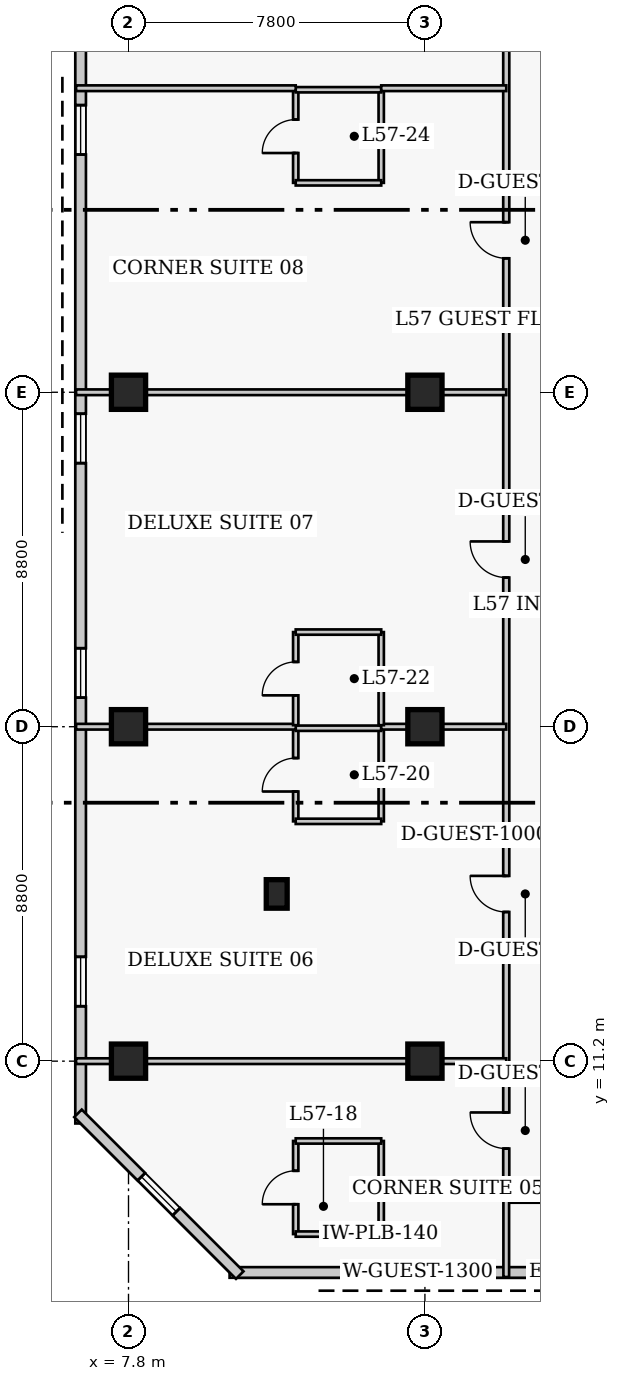
"""IFC4 building model, lengths in metres.
Left out: names, types, materials, properties, quantities, classifications, styles, units other than length and angle.
Written with IfcOpenShell. Run it as: python <this file> out.ifc"""

import sys

from ifc_helpers import new_model, si_unit, direction, frame, frame_2d, origin, origin_2d, place, context, subcontext, project, spatial, rectangle, extrude, element, fill, save


model = new_model("IFC4")
c1 = context("Model", 3, precision=1e-05, world=origin(), true_north=direction((0.0, 1.0)))
c2 = subcontext(c1, "Body", "Model", "MODEL_VIEW")
j1 = project(units=[si_unit("LENGTHUNIT", "METRE"), si_unit("PLANEANGLEUNIT", "RADIAN")], contexts=[c1])
p1 = place(None, origin())
s1 = spatial("IfcSite", under=j1, at=p1, CompositionType="ELEMENT")
p2 = place(p1, origin())
s2 = spatial("IfcBuilding", under=s1, at=p2, CompositionType="ELEMENT")
p3 = place(p2, frame((0.0, 0.0, 228.0)))
s3 = spatial("IfcBuildingStorey", under=s2, at=p3, CompositionType="ELEMENT", Elevation=228.0)
for number, where, z_axis, x_axis in (
    (1, (7.8, 11.2, 0.0), (0.0, 0.0, 1.0), (1.0, 0.0, 0.0)),
    (2, (7.8, 20.0, 0.0), (0.0, 0.0, 1.0), (1.0, 0.0, 0.0)),
    (3, (7.8, 28.8, 0.0), (0.0, 0.0, 1.0), (1.0, 0.0, 0.0)),
    (4, (15.6, 11.2, 0.0), (0.0, 0.0, 1.0), (1.0, 0.0, 0.0)),
    (5, (15.6, 20.0, 0.0), (0.0, 0.0, 1.0), (1.0, 0.0, 0.0)),
    (6, (15.6, 28.8, 0.0), (0.0, 0.0, 1.0), (1.0, 0.0, 0.0)),
):
    element("IfcColumn", number, at=place(p3, frame(where, z_axis=z_axis, x_axis=x_axis)), inside=s3, PredefinedType="COLUMN", context=c2, shape_type="SweptSolid", body=[
        extrude(rectangle(XDim=0.9, YDim=0.9, at=origin_2d()), origin(), (0.0, 0.0, 1.0), 3.9),
    ])
p4 = place(p3, frame((11.7, 15.6, 0.0), z_axis=(0.0, 0.0, 1.0), x_axis=(1.0, 0.0, 0.0)))
e7 = element("IfcColumn", 7, at=p4, inside=s3, PredefinedType="PILASTER", context=c2, shape_type="SweptSolid", body=[
    extrude(rectangle(XDim=0.55, YDim=0.75, at=origin_2d()), origin(), (0.0, 0.0, 1.0), 3.9),
])
p5 = place(p3, frame((10.46, 5.64, 0.0), z_axis=(0.0, 0.0, 1.0), x_axis=(1.0, 0.0, 0.0)))
e8 = element("IfcWall", 8, at=p5, inside=s3, PredefinedType="SOLIDWALL", context=c2, shape_type="SweptSolid", body=[
    extrude(rectangle(XDim=25.83, YDim=0.28, at=frame_2d((12.915, 0.0))), origin(), (0.0, 0.0, 1.0), 3.56),
])
p6 = place(p5, frame((4.305, 0.0, 0.85)))
e9 = element("IfcOpeningElement", 9, at=p6, cuts=e8, PredefinedType="OPENING", context=c2, shape_type="SweptSolid", body=[
    extrude(rectangle(XDim=1.3, YDim=1.7, at=frame_2d((0.65, 0.85))), frame((0.0, 0.15, 0.0), z_axis=(0.0, -1.0, 0.0), x_axis=(1.0, 0.0, 0.0)), (0.0, 0.0, 1.0), 0.3),
])
p7 = place(p5, frame((11.615, 0.0, 0.85)))
e10 = element("IfcOpeningElement", 10, at=p7, cuts=e8, PredefinedType="OPENING", context=c2, shape_type="SweptSolid", body=[
    extrude(rectangle(XDim=1.3, YDim=1.7, at=frame_2d((0.65, 0.85))), frame((0.0, 0.15, 0.0), z_axis=(0.0, -1.0, 0.0), x_axis=(1.0, 0.0, 0.0)), (0.0, 0.0, 1.0), 0.3),
])
p8 = place(p5, frame((20.875, 0.0, 0.85)))
e11 = element("IfcOpeningElement", 11, at=p8, cuts=e8, PredefinedType="OPENING", context=c2, shape_type="SweptSolid", body=[
    extrude(rectangle(XDim=1.3, YDim=1.7, at=frame_2d((0.65, 0.85))), frame((0.0, 0.15, 0.0), z_axis=(0.0, -1.0, 0.0), x_axis=(1.0, 0.0, 0.0)), (0.0, 0.0, 1.0), 0.3),
])
p9 = place(p5, frame((17.125, 0.0, 0.85)))
e12 = element("IfcOpeningElement", 12, at=p9, cuts=e8, PredefinedType="OPENING", context=c2, shape_type="SweptSolid", body=[
    extrude(rectangle(XDim=1.3, YDim=1.7, at=frame_2d((0.65, 0.85))), frame((0.0, 0.15, 0.0), z_axis=(0.0, -1.0, 0.0), x_axis=(1.0, 0.0, 0.0)), (0.0, 0.0, 1.0), 0.3),
])
p10 = place(p3, frame((6.54, 39.44, 0.0), z_axis=(0.0, 0.0, 1.0), x_axis=(0.0, -1.0, 0.0)))
e13 = element("IfcWall", 13, at=p10, inside=s3, PredefinedType="SOLIDWALL", context=c2, shape_type="SweptSolid", body=[
    extrude(rectangle(XDim=29.88, YDim=0.28, at=frame_2d((14.94, 0.0))), origin(), (0.0, 0.0, 1.0), 3.56),
])
p11 = place(p10, frame((3.085, 0.0, 0.85)))
e14 = element("IfcOpeningElement", 14, at=p11, cuts=e13, PredefinedType="OPENING", context=c2, shape_type="SweptSolid", body=[
    extrude(rectangle(XDim=1.3, YDim=1.7, at=frame_2d((0.65, 0.85))), frame((0.0, 0.15, 0.0), z_axis=(0.0, -1.0, 0.0), x_axis=(1.0, 0.0, 0.0)), (0.0, 0.0, 1.0), 0.3),
])
p12 = place(p10, frame((11.205, 0.0, 0.85)))
e15 = element("IfcOpeningElement", 15, at=p12, cuts=e13, PredefinedType="OPENING", context=c2, shape_type="SweptSolid", body=[
    extrude(rectangle(XDim=1.3, YDim=1.7, at=frame_2d((0.65, 0.85))), frame((0.0, 0.15, 0.0), z_axis=(0.0, -1.0, 0.0), x_axis=(1.0, 0.0, 0.0)), (0.0, 0.0, 1.0), 0.3),
])
p13 = place(p10, frame((17.375, 0.0, 0.85)))
e16 = element("IfcOpeningElement", 16, at=p13, cuts=e13, PredefinedType="OPENING", context=c2, shape_type="SweptSolid", body=[
    extrude(rectangle(XDim=1.3, YDim=1.7, at=frame_2d((0.65, 0.85))), frame((0.0, 0.15, 0.0), z_axis=(0.0, -1.0, 0.0), x_axis=(1.0, 0.0, 0.0)), (0.0, 0.0, 1.0), 0.3),
])
p14 = place(p10, frame((25.495, 0.0, 0.85)))
e17 = element("IfcOpeningElement", 17, at=p14, cuts=e13, PredefinedType="OPENING", context=c2, shape_type="SweptSolid", body=[
    extrude(rectangle(XDim=1.3, YDim=1.7, at=frame_2d((0.65, 0.85))), frame((0.0, 0.15, 0.0), z_axis=(0.0, -1.0, 0.0), x_axis=(1.0, 0.0, 0.0)), (0.0, 0.0, 1.0), 0.3),
])
p15 = place(p3, frame((6.471, 9.827, 0.0), z_axis=(0.0, 0.0, 1.0), x_axis=(0.707106781187, -0.707106781187, 0.0)))
e18 = element("IfcWall", 18, at=p15, inside=s3, PredefinedType="SOLIDWALL", context=c2, shape_type="SweptSolid", body=[
    extrude(rectangle(XDim=6.02, YDim=0.28, at=frame_2d((3.01, 0.0))), origin(), (0.0, 0.0, 1.0), 3.56),
])
p16 = place(p15, frame((2.36, 0.0, 0.85)))
e19 = element("IfcOpeningElement", 19, at=p16, cuts=e18, PredefinedType="OPENING", context=c2, shape_type="SweptSolid", body=[
    extrude(rectangle(XDim=1.3, YDim=1.7, at=frame_2d((0.65, 0.85))), frame((0.0, 0.15, 0.0), z_axis=(0.0, -1.0, 0.0), x_axis=(1.0, 0.0, 0.0)), (0.0, 0.0, 1.0), 0.3),
])
p17 = place(p3, frame((17.74, 7.55, 0.0), z_axis=(0.0, 0.0, 1.0), x_axis=(0.0, 1.0, 0.0)))
e20 = element("IfcWall", 20, at=p17, inside=s3, PredefinedType="PARTITIONING", context=c2, shape_type="SweptSolid", body=[
    extrude(rectangle(XDim=33.1, YDim=0.16, at=frame_2d((16.55, 0.0))), origin(), (0.0, 0.0, 1.0), 3.56),
])
p18 = place(p17, frame((1.35, 0.0, 0.0)))
e21 = element("IfcOpeningElement", 21, at=p18, cuts=e20, PredefinedType="OPENING", context=c2, shape_type="SweptSolid", body=[
    extrude(rectangle(XDim=0.95, YDim=2.1, at=frame_2d((0.475, 1.05))), frame((0.0, 0.09, 0.0), z_axis=(0.0, -1.0, 0.0), x_axis=(1.0, 0.0, 0.0)), (0.0, 0.0, 1.0), 0.18),
])
p19 = place(p17, frame((7.575, 0.0, 0.0)))
e22 = element("IfcOpeningElement", 22, at=p19, cuts=e20, PredefinedType="OPENING", context=c2, shape_type="SweptSolid", body=[
    extrude(rectangle(XDim=0.95, YDim=2.1, at=frame_2d((0.475, 1.05))), frame((0.0, 0.09, 0.0), z_axis=(0.0, -1.0, 0.0), x_axis=(1.0, 0.0, 0.0)), (0.0, 0.0, 1.0), 0.18),
])
p20 = place(p17, frame((16.375, 0.0, 0.0)))
e23 = element("IfcOpeningElement", 23, at=p20, cuts=e20, PredefinedType="OPENING", context=c2, shape_type="SweptSolid", body=[
    extrude(rectangle(XDim=0.95, YDim=2.1, at=frame_2d((0.475, 1.05))), frame((0.0, 0.09, 0.0), z_axis=(0.0, -1.0, 0.0), x_axis=(1.0, 0.0, 0.0)), (0.0, 0.0, 1.0), 0.18),
])
p21 = place(p17, frame((24.775, 0.0, 0.0)))
e24 = element("IfcOpeningElement", 24, at=p21, cuts=e20, PredefinedType="OPENING", context=c2, shape_type="SweptSolid", body=[
    extrude(rectangle(XDim=0.95, YDim=2.1, at=frame_2d((0.475, 1.05))), frame((0.0, 0.09, 0.0), z_axis=(0.0, -1.0, 0.0), x_axis=(1.0, 0.0, 0.0)), (0.0, 0.0, 1.0), 0.18),
])
p22 = place(p17, frame((31.486, 0.0, 0.0)))
e25 = element("IfcOpeningElement", 25, at=p22, cuts=e20, PredefinedType="OPENING", context=c2, shape_type="SweptSolid", body=[
    extrude(rectangle(XDim=1.0, YDim=2.15, at=frame_2d((0.5, 1.075))), frame((0.0, 0.09, 0.0), z_axis=(0.0, -1.0, 0.0), x_axis=(1.0, 0.0, 0.0)), (0.0, 0.0, 1.0), 0.18),
])
p23 = place(p3, frame((17.74, 7.55, 0.0), z_axis=(0.0, 0.0, 1.0), x_axis=(1.0, 0.0, 0.0)))
e26 = element("IfcWall", 26, at=p23, inside=s3, PredefinedType="PARTITIONING", context=c2, shape_type="SweptSolid", body=[
    extrude(rectangle(XDim=2.22, YDim=0.15, at=frame_2d((1.11, 0.0))), origin(), (0.0, 0.0, 1.0), 3.56),
])
p24 = place(p3, frame((17.74, 5.52, 0.0), z_axis=(0.0, 0.0, 1.0), x_axis=(0.0, 1.0, 0.0)))
e27 = element("IfcWall", 27, at=p24, inside=s3, PredefinedType="PARTITIONING", context=c2, shape_type="SweptSolid", body=[
    extrude(rectangle(XDim=2.03, YDim=0.15, at=frame_2d((1.015, 0.0))), origin(), (0.0, 0.0, 1.0), 3.56),
])
p25 = place(p3, frame((12.2, 6.65, 0.0), z_axis=(0.0, 0.0, 1.0), x_axis=(0.0, 1.0, 0.0)))
e28 = element("IfcWall", 28, at=p25, inside=s3, PredefinedType="PLUMBINGWALL", context=c2, shape_type="SweptSolid", body=[
    extrude(rectangle(XDim=2.45, YDim=0.14, at=frame_2d((1.225, 0.0))), origin(), (0.0, 0.0, 1.0), 3.56),
])
p26 = place(p25, frame((0.785, 0.0, 0.0)))
e29 = element("IfcOpeningElement", 29, at=p26, cuts=e28, PredefinedType="OPENING", context=c2, shape_type="SweptSolid", body=[
    extrude(rectangle(XDim=0.88, YDim=2.05, at=frame_2d((0.44, 1.025))), frame((0.0, 0.08, 0.0), z_axis=(0.0, -1.0, 0.0), x_axis=(1.0, 0.0, 0.0)), (0.0, 0.0, 1.0), 0.16),
])
p27 = place(p3, frame((14.45, 6.65, 0.0), z_axis=(0.0, 0.0, 1.0), x_axis=(0.0, 1.0, 0.0)))
e30 = element("IfcWall", 30, at=p27, inside=s3, PredefinedType="PLUMBINGWALL", context=c2, shape_type="SweptSolid", body=[
    extrude(rectangle(XDim=2.45, YDim=0.14, at=frame_2d((1.225, 0.0))), origin(), (0.0, 0.0, 1.0), 3.56),
])
for number, where, z_axis, x_axis in (
    (31, (12.2, 6.65, 0.0), (0.0, 0.0, 1.0), (1.0, 0.0, 0.0)),
    (32, (12.2, 9.1, 0.0), (0.0, 0.0, 1.0), (1.0, 0.0, 0.0)),
):
    element("IfcWall", number, at=place(p3, frame(where, z_axis=z_axis, x_axis=x_axis)), inside=s3, PredefinedType="PLUMBINGWALL", context=c2, shape_type="SweptSolid", body=[
        extrude(rectangle(XDim=2.25, YDim=0.14, at=frame_2d((1.125, 0.0))), origin(), (0.0, 0.0, 1.0), 3.56),
    ])
p28 = place(p3, frame((6.42, 11.2, 0.0), z_axis=(0.0, 0.0, 1.0), x_axis=(1.0, 0.0, 0.0)))
e33 = element("IfcWall", 33, at=p28, inside=s3, PredefinedType="PARTITIONING", context=c2, shape_type="SweptSolid", body=[
    extrude(rectangle(XDim=11.32, YDim=0.15, at=frame_2d((5.66, 0.0))), origin(), (0.0, 0.0, 1.0), 2.788),
])
p29 = place(p3, frame((12.2, 17.51, 0.0), z_axis=(0.0, 0.0, 1.0), x_axis=(0.0, 1.0, 0.0)))
e34 = element("IfcWall", 34, at=p29, inside=s3, PredefinedType="PLUMBINGWALL", context=c2, shape_type="SweptSolid", body=[
    extrude(rectangle(XDim=2.45, YDim=0.14, at=frame_2d((1.225, 0.0))), origin(), (0.0, 0.0, 1.0), 3.56),
])
p30 = place(p29, frame((0.785, 0.0, 0.0)))
e35 = element("IfcOpeningElement", 35, at=p30, cuts=e34, PredefinedType="OPENING", context=c2, shape_type="SweptSolid", body=[
    extrude(rectangle(XDim=0.88, YDim=2.05, at=frame_2d((0.44, 1.025))), frame((0.0, 0.08, 0.0), z_axis=(0.0, -1.0, 0.0), x_axis=(1.0, 0.0, 0.0)), (0.0, 0.0, 1.0), 0.16),
])
p31 = place(p3, frame((14.45, 17.51, 0.0), z_axis=(0.0, 0.0, 1.0), x_axis=(0.0, 1.0, 0.0)))
e36 = element("IfcWall", 36, at=p31, inside=s3, PredefinedType="PLUMBINGWALL", context=c2, shape_type="SweptSolid", body=[
    extrude(rectangle(XDim=2.45, YDim=0.14, at=frame_2d((1.225, 0.0))), origin(), (0.0, 0.0, 1.0), 3.56),
])
p32 = place(p3, frame((12.2, 17.51, 0.0), z_axis=(0.0, 0.0, 1.0), x_axis=(1.0, 0.0, 0.0)))
e37 = element("IfcWall", 37, at=p32, inside=s3, PredefinedType="PLUMBINGWALL", context=c2, shape_type="SweptSolid", body=[
    extrude(rectangle(XDim=2.25, YDim=0.14, at=frame_2d((1.125, 0.0))), origin(), (0.0, 0.0, 1.0), 3.56),
])
p33 = place(p3, frame((12.2, 19.96, 0.0), z_axis=(0.0, 0.0, 1.0), x_axis=(1.0, 0.0, 0.0)))
e38 = element("IfcWall", 38, at=p33, inside=s3, PredefinedType="PLUMBINGWALL", context=c2, shape_type="SweptSolid", body=[
    extrude(rectangle(XDim=2.25, YDim=0.14, at=frame_2d((1.125, 0.0))), origin(), (0.0, 0.0, 1.0), 2.948),
])
p34 = place(p3, frame((6.42, 20.0, 0.0), z_axis=(0.0, 0.0, 1.0), x_axis=(1.0, 0.0, 0.0)))
e39 = element("IfcWall", 39, at=p34, inside=s3, PredefinedType="PARTITIONING", context=c2, shape_type="SweptSolid", body=[
    extrude(rectangle(XDim=5.78, YDim=0.15, at=frame_2d((2.89, 0.0))), origin(), (0.0, 0.0, 1.0), 2.788),
])
p35 = place(p3, frame((14.45, 20.0, 0.0), z_axis=(0.0, 0.0, 1.0), x_axis=(1.0, 0.0, 0.0)))
e40 = element("IfcWall", 40, at=p35, inside=s3, PredefinedType="PARTITIONING", context=c2, shape_type="SweptSolid", body=[
    extrude(rectangle(XDim=3.29, YDim=0.15, at=frame_2d((1.645, 0.0))), origin(), (0.0, 0.0, 1.0), 2.788),
])
p36 = place(p3, frame((12.2, 20.04, 0.0), z_axis=(0.0, 0.0, 1.0), x_axis=(0.0, 1.0, 0.0)))
e41 = element("IfcWall", 41, at=p36, inside=s3, PredefinedType="PLUMBINGWALL", context=c2, shape_type="SweptSolid", body=[
    extrude(rectangle(XDim=2.45, YDim=0.14, at=frame_2d((1.225, 0.0))), origin(), (0.0, 0.0, 1.0), 3.56),
])
p37 = place(p36, frame((0.785, 0.0, 0.0)))
e42 = element("IfcOpeningElement", 42, at=p37, cuts=e41, PredefinedType="OPENING", context=c2, shape_type="SweptSolid", body=[
    extrude(rectangle(XDim=0.88, YDim=2.05, at=frame_2d((0.44, 1.025))), frame((0.0, 0.08, 0.0), z_axis=(0.0, -1.0, 0.0), x_axis=(1.0, 0.0, 0.0)), (0.0, 0.0, 1.0), 0.16),
])
p38 = place(p3, frame((14.45, 20.04, 0.0), z_axis=(0.0, 0.0, 1.0), x_axis=(0.0, 1.0, 0.0)))
e43 = element("IfcWall", 43, at=p38, inside=s3, PredefinedType="PLUMBINGWALL", context=c2, shape_type="SweptSolid", body=[
    extrude(rectangle(XDim=2.45, YDim=0.14, at=frame_2d((1.225, 0.0))), origin(), (0.0, 0.0, 1.0), 3.56),
])
p39 = place(p3, frame((12.2, 22.49, 0.0), z_axis=(0.0, 0.0, 1.0), x_axis=(1.0, 0.0, 0.0)))
e44 = element("IfcWall", 44, at=p39, inside=s3, PredefinedType="PLUMBINGWALL", context=c2, shape_type="SweptSolid", body=[
    extrude(rectangle(XDim=2.25, YDim=0.14, at=frame_2d((1.125, 0.0))), origin(), (0.0, 0.0, 1.0), 3.56),
])
p40 = place(p3, frame((6.42, 28.8, 0.0), z_axis=(0.0, 0.0, 1.0), x_axis=(1.0, 0.0, 0.0)))
e45 = element("IfcWall", 45, at=p40, inside=s3, PredefinedType="PARTITIONING", context=c2, shape_type="SweptSolid", body=[
    extrude(rectangle(XDim=11.32, YDim=0.15, at=frame_2d((5.66, 0.0))), origin(), (0.0, 0.0, 1.0), 2.788),
])
p41 = place(p3, frame((12.2, 34.31, 0.0), z_axis=(0.0, 0.0, 1.0), x_axis=(0.0, 1.0, 0.0)))
e46 = element("IfcWall", 46, at=p41, inside=s3, PredefinedType="PLUMBINGWALL", context=c2, shape_type="SweptSolid", body=[
    extrude(rectangle(XDim=2.45, YDim=0.14, at=frame_2d((1.225, 0.0))), origin(), (0.0, 0.0, 1.0), 3.56),
])
p42 = place(p41, frame((0.785, 0.0, 0.0)))
e47 = element("IfcOpeningElement", 47, at=p42, cuts=e46, PredefinedType="OPENING", context=c2, shape_type="SweptSolid", body=[
    extrude(rectangle(XDim=0.88, YDim=2.05, at=frame_2d((0.44, 1.025))), frame((0.0, 0.08, 0.0), z_axis=(0.0, -1.0, 0.0), x_axis=(1.0, 0.0, 0.0)), (0.0, 0.0, 1.0), 0.16),
])
p43 = place(p3, frame((14.45, 34.31, 0.0), z_axis=(0.0, 0.0, 1.0), x_axis=(0.0, 1.0, 0.0)))
e48 = element("IfcWall", 48, at=p43, inside=s3, PredefinedType="PLUMBINGWALL", context=c2, shape_type="SweptSolid", body=[
    extrude(rectangle(XDim=2.45, YDim=0.14, at=frame_2d((1.225, 0.0))), origin(), (0.0, 0.0, 1.0), 3.56),
])
for number, where, z_axis, x_axis in (
    (49, (12.2, 34.31, 0.0), (0.0, 0.0, 1.0), (1.0, 0.0, 0.0)),
    (50, (12.2, 36.76, 0.0), (0.0, 0.0, 1.0), (1.0, 0.0, 0.0)),
):
    element("IfcWall", number, at=place(p3, frame(where, z_axis=z_axis, x_axis=x_axis)), inside=s3, PredefinedType="PLUMBINGWALL", context=c2, shape_type="SweptSolid", body=[
        extrude(rectangle(XDim=2.25, YDim=0.14, at=frame_2d((1.125, 0.0))), origin(), (0.0, 0.0, 1.0), 3.56),
    ])
p44 = place(p3, frame((6.42, 36.8, 0.0), z_axis=(0.0, 0.0, 1.0), x_axis=(1.0, 0.0, 0.0)))
e51 = element("IfcWall", 51, at=p44, inside=s3, PredefinedType="PARTITIONING", context=c2, shape_type="SweptSolid", body=[
    extrude(rectangle(XDim=5.78, YDim=0.15, at=frame_2d((2.89, 0.0))), origin(), (0.0, 0.0, 1.0), 3.56),
])
p45 = place(p3, frame((14.45, 36.8, 0.0), z_axis=(0.0, 0.0, 1.0), x_axis=(1.0, 0.0, 0.0)))
e52 = element("IfcWall", 52, at=p45, inside=s3, PredefinedType="PARTITIONING", context=c2, shape_type="SweptSolid", body=[
    extrude(rectangle(XDim=3.29, YDim=0.15, at=frame_2d((1.645, 0.0))), origin(), (0.0, 0.0, 1.0), 3.56),
])
p46 = place(p6, origin())
e53 = element("IfcWindow", 53, at=p46, inside=s3, PartitioningType="SINGLE_PANEL", PredefinedType="WINDOW", context=c2, shape_type="SweptSolid", body=[
    extrude(rectangle(XDim=1.3, YDim=1.7, at=frame_2d((0.65, 0.85))), frame((0.0, 0.03, 0.0), z_axis=(0.0, -1.0, 0.0), x_axis=(1.0, 0.0, 0.0)), (0.0, 0.0, 1.0), 0.06),
])
fill(e9, e53)
p47 = place(p11, origin())
e54 = element("IfcWindow", 54, at=p47, inside=s3, PartitioningType="SINGLE_PANEL", PredefinedType="WINDOW", context=c2, shape_type="SweptSolid", body=[
    extrude(rectangle(XDim=1.3, YDim=1.7, at=frame_2d((0.65, 0.85))), frame((0.0, 0.03, 0.0), z_axis=(0.0, -1.0, 0.0), x_axis=(1.0, 0.0, 0.0)), (0.0, 0.0, 1.0), 0.06),
])
fill(e14, e54)
p48 = place(p12, origin())
e55 = element("IfcWindow", 55, at=p48, inside=s3, PartitioningType="SINGLE_PANEL", PredefinedType="WINDOW", context=c2, shape_type="SweptSolid", body=[
    extrude(rectangle(XDim=1.3, YDim=1.7, at=frame_2d((0.65, 0.85))), frame((0.0, 0.03, 0.0), z_axis=(0.0, -1.0, 0.0), x_axis=(1.0, 0.0, 0.0)), (0.0, 0.0, 1.0), 0.06),
])
fill(e15, e55)
p49 = place(p13, origin())
e56 = element("IfcWindow", 56, at=p49, inside=s3, PartitioningType="SINGLE_PANEL", PredefinedType="WINDOW", context=c2, shape_type="SweptSolid", body=[
    extrude(rectangle(XDim=1.3, YDim=1.7, at=frame_2d((0.65, 0.85))), frame((0.0, 0.03, 0.0), z_axis=(0.0, -1.0, 0.0), x_axis=(1.0, 0.0, 0.0)), (0.0, 0.0, 1.0), 0.06),
])
fill(e16, e56)
p50 = place(p14, origin())
e57 = element("IfcWindow", 57, at=p50, inside=s3, PartitioningType="SINGLE_PANEL", PredefinedType="WINDOW", context=c2, shape_type="SweptSolid", body=[
    extrude(rectangle(XDim=1.3, YDim=1.7, at=frame_2d((0.65, 0.85))), frame((0.0, 0.03, 0.0), z_axis=(0.0, -1.0, 0.0), x_axis=(1.0, 0.0, 0.0)), (0.0, 0.0, 1.0), 0.06),
])
fill(e17, e57)
p51 = place(p16, origin())
e58 = element("IfcWindow", 58, at=p51, inside=s3, PartitioningType="SINGLE_PANEL", PredefinedType="WINDOW", context=c2, shape_type="SweptSolid", body=[
    extrude(rectangle(XDim=1.3, YDim=1.7, at=frame_2d((0.65, 0.85))), frame((0.0, 0.03, 0.0), z_axis=(0.0, -1.0, 0.0), x_axis=(1.0, 0.0, 0.0)), (0.0, 0.0, 1.0), 0.06),
])
fill(e19, e58)
p52 = place(p26, origin())
e59 = element("IfcDoor", 59, at=p52, inside=s3, OperationType="SINGLE_SWING_LEFT", PredefinedType="DOOR", context=c2, shape_type="SweptSolid", body=[
    extrude(rectangle(XDim=0.88, YDim=2.05, at=frame_2d((0.44, 1.025))), frame((0.0, 0.025, 0.0), z_axis=(0.0, -1.0, 0.0), x_axis=(1.0, 0.0, 0.0)), (0.0, 0.0, 1.0), 0.05),
])
fill(e29, e59)
p53 = place(p18, origin())
e60 = element("IfcDoor", 60, at=p53, inside=s3, OperationType="SINGLE_SWING_RIGHT", PredefinedType="DOOR", context=c2, shape_type="SweptSolid", body=[
    extrude(rectangle(XDim=0.95, YDim=2.1, at=frame_2d((0.475, 1.05))), frame((0.0, 0.025, 0.0), z_axis=(0.0, -1.0, 0.0), x_axis=(1.0, 0.0, 0.0)), (0.0, 0.0, 1.0), 0.05),
])
fill(e21, e60)
p54 = place(p30, origin())
e61 = element("IfcDoor", 61, at=p54, inside=s3, OperationType="SINGLE_SWING_LEFT", PredefinedType="DOOR", context=c2, shape_type="SweptSolid", body=[
    extrude(rectangle(XDim=0.88, YDim=2.05, at=frame_2d((0.44, 1.025))), frame((0.0, 0.025, 0.0), z_axis=(0.0, -1.0, 0.0), x_axis=(1.0, 0.0, 0.0)), (0.0, 0.0, 1.0), 0.05),
])
fill(e35, e61)
p55 = place(p19, origin())
e62 = element("IfcDoor", 62, at=p55, inside=s3, OperationType="SINGLE_SWING_RIGHT", PredefinedType="DOOR", context=c2, shape_type="SweptSolid", body=[
    extrude(rectangle(XDim=0.95, YDim=2.1, at=frame_2d((0.475, 1.05))), frame((0.0, 0.025, 0.0), z_axis=(0.0, -1.0, 0.0), x_axis=(1.0, 0.0, 0.0)), (0.0, 0.0, 1.0), 0.05),
])
fill(e22, e62)
p56 = place(p37, origin())
e63 = element("IfcDoor", 63, at=p56, inside=s3, OperationType="SINGLE_SWING_LEFT", PredefinedType="DOOR", context=c2, shape_type="SweptSolid", body=[
    extrude(rectangle(XDim=0.88, YDim=2.05, at=frame_2d((0.44, 1.025))), frame((0.0, 0.025, 0.0), z_axis=(0.0, -1.0, 0.0), x_axis=(1.0, 0.0, 0.0)), (0.0, 0.0, 1.0), 0.05),
])
fill(e42, e63)
p57 = place(p20, origin())
e64 = element("IfcDoor", 64, at=p57, inside=s3, OperationType="SINGLE_SWING_RIGHT", PredefinedType="DOOR", context=c2, shape_type="SweptSolid", body=[
    extrude(rectangle(XDim=0.95, YDim=2.1, at=frame_2d((0.475, 1.05))), frame((0.0, 0.025, 0.0), z_axis=(0.0, -1.0, 0.0), x_axis=(1.0, 0.0, 0.0)), (0.0, 0.0, 1.0), 0.05),
])
fill(e23, e64)
p58 = place(p42, origin())
e65 = element("IfcDoor", 65, at=p58, inside=s3, OperationType="SINGLE_SWING_LEFT", PredefinedType="DOOR", context=c2, shape_type="SweptSolid", body=[
    extrude(rectangle(XDim=0.88, YDim=2.05, at=frame_2d((0.44, 1.025))), frame((0.0, 0.025, 0.0), z_axis=(0.0, -1.0, 0.0), x_axis=(1.0, 0.0, 0.0)), (0.0, 0.0, 1.0), 0.05),
])
fill(e47, e65)
p59 = place(p21, origin())
e66 = element("IfcDoor", 66, at=p59, inside=s3, OperationType="SINGLE_SWING_RIGHT", PredefinedType="DOOR", context=c2, shape_type="SweptSolid", body=[
    extrude(rectangle(XDim=0.95, YDim=2.1, at=frame_2d((0.475, 1.05))), frame((0.0, 0.025, 0.0), z_axis=(0.0, -1.0, 0.0), x_axis=(1.0, 0.0, 0.0)), (0.0, 0.0, 1.0), 0.05),
])
fill(e24, e66)
save(model, sys.argv[1])
